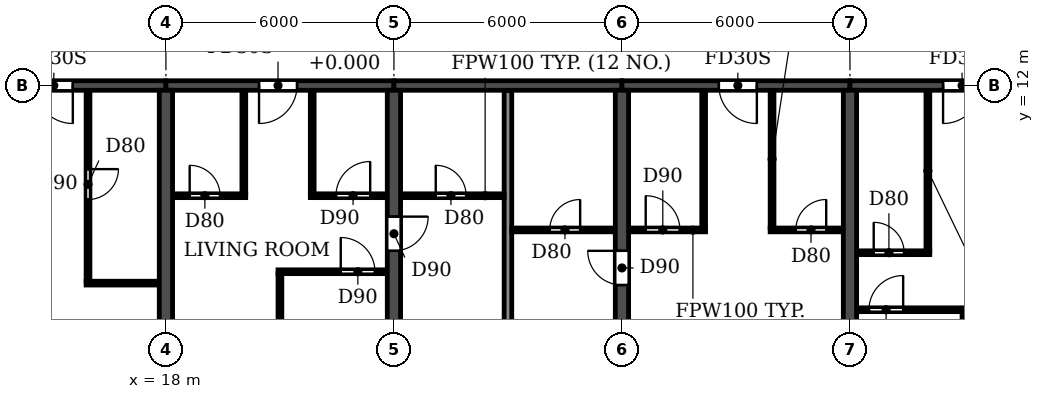
"""IFC4 building model, lengths in metres.
Left out: names, types, materials, properties, quantities, classifications, styles, units other than length and angle.
Written with IfcOpenShell. Run it as: python <this file> out.ifc"""

import sys

from ifc_helpers import new_model, si_unit, direction, frame, frame_2d, origin, place, context, subcontext, project, spatial, rectangle, extrude, element, fill, save


model = new_model("IFC4")
c1 = context("Model", 3, precision=1e-05, world=origin(), true_north=direction((0.0, 1.0)))
c2 = subcontext(c1, "Body", "Model", "MODEL_VIEW")
j1 = project(units=[si_unit("LENGTHUNIT", "METRE"), si_unit("PLANEANGLEUNIT", "RADIAN")], contexts=[c1])
p1 = place(None, origin())
s1 = spatial("IfcSite", under=j1, at=p1, CompositionType="ELEMENT")
p2 = place(p1, origin())
s2 = spatial("IfcBuilding", under=s1, at=p2, CompositionType="ELEMENT")
p3 = place(p2, frame((0.0, 0.0, 92.7)))
s3 = spatial("IfcBuildingStorey", under=s2, at=p3, CompositionType="ELEMENT", Elevation=92.7)
p4 = place(p3, frame((18.0, 0.2, 0.0), z_axis=(0.0, 0.0, 1.0), x_axis=(0.0, 1.0, 0.0)))
e1 = element("IfcWall", 1, at=p4, inside=s3, PredefinedType="SHEAR", context=c2, shape_type="SweptSolid", body=[
    extrude(rectangle(XDim=11.675, YDim=0.35, at=frame_2d((5.837, 0.0))), origin(), (0.0, 0.0, 1.0), 3.06),
])
p5 = place(p3, frame((24.0, 0.2, 0.0), z_axis=(0.0, 0.0, 1.0), x_axis=(0.0, 1.0, 0.0)))
e2 = element("IfcWall", 2, at=p5, inside=s3, PredefinedType="SHEAR", context=c2, shape_type="SweptSolid", body=[
    extrude(rectangle(XDim=11.675, YDim=0.35, at=frame_2d((5.837, 0.0))), origin(), (0.0, 0.0, 1.0), 3.06),
])
p6 = place(p5, frame((7.45, 0.0, 0.0)))
e3 = element("IfcOpeningElement", 3, at=p6, cuts=e2, PredefinedType="OPENING", context=c2, shape_type="SweptSolid", body=[
    extrude(rectangle(XDim=0.9, YDim=2.1, at=frame_2d((0.45, 1.05))), frame((0.0, 0.185, 0.0), z_axis=(0.0, -1.0, 0.0), x_axis=(1.0, 0.0, 0.0)), (0.0, 0.0, 1.0), 0.37),
])
p7 = place(p3, frame((30.0, 0.2, 0.0), z_axis=(0.0, 0.0, 1.0), x_axis=(0.0, 1.0, 0.0)))
e4 = element("IfcWall", 4, at=p7, inside=s3, PredefinedType="SHEAR", context=c2, shape_type="SweptSolid", body=[
    extrude(rectangle(XDim=11.675, YDim=0.35, at=frame_2d((5.837, 0.0))), origin(), (0.0, 0.0, 1.0), 3.06),
])
p8 = place(p7, frame((6.55, 0.0, 0.0)))
e5 = element("IfcOpeningElement", 5, at=p8, cuts=e4, PredefinedType="OPENING", context=c2, shape_type="SweptSolid", body=[
    extrude(rectangle(XDim=0.9, YDim=2.1, at=frame_2d((0.45, 1.05))), frame((0.0, 0.185, 0.0), z_axis=(0.0, -1.0, 0.0), x_axis=(1.0, 0.0, 0.0)), (0.0, 0.0, 1.0), 0.37),
])
p9 = place(p3, frame((36.0, 0.2, 0.0), z_axis=(0.0, 0.0, 1.0), x_axis=(0.0, 1.0, 0.0)))
e6 = element("IfcWall", 6, at=p9, inside=s3, PredefinedType="SHEAR", context=c2, shape_type="SweptSolid", body=[
    extrude(rectangle(XDim=11.675, YDim=0.35, at=frame_2d((5.837, 0.0))), origin(), (0.0, 0.0, 1.0), 3.06),
])
p10 = place(p3, frame((12.0, 12.0, 0.0), z_axis=(0.0, 0.0, 1.0), x_axis=(1.0, 0.0, 0.0)))
e7 = element("IfcWall", 7, at=p10, inside=s3, PredefinedType="SHEAR", context=c2, shape_type="SweptSolid", body=[
    extrude(rectangle(XDim=6.0, YDim=0.25, at=frame_2d((3.0, 0.0))), origin(), (0.0, 0.0, 1.0), 2.46),
])
p11 = place(p10, frame((2.55, 0.0, 0.0)))
e8 = element("IfcOpeningElement", 8, at=p11, cuts=e7, PredefinedType="OPENING", context=c2, shape_type="SweptSolid", body=[
    extrude(rectangle(XDim=1.0, YDim=2.1, at=frame_2d((0.5, 1.05))), frame((0.0, 0.135, 0.0), z_axis=(0.0, -1.0, 0.0), x_axis=(1.0, 0.0, 0.0)), (0.0, 0.0, 1.0), 0.27),
])
p12 = place(p3, frame((18.0, 12.0, 0.0), z_axis=(0.0, 0.0, 1.0), x_axis=(1.0, 0.0, 0.0)))
e9 = element("IfcWall", 9, at=p12, inside=s3, PredefinedType="SHEAR", context=c2, shape_type="SweptSolid", body=[
    extrude(rectangle(XDim=6.0, YDim=0.25, at=frame_2d((3.0, 0.0))), origin(), (0.0, 0.0, 1.0), 2.46),
])
p13 = place(p12, frame((2.45, 0.0, 0.0)))
e10 = element("IfcOpeningElement", 10, at=p13, cuts=e9, PredefinedType="OPENING", context=c2, shape_type="SweptSolid", body=[
    extrude(rectangle(XDim=1.0, YDim=2.1, at=frame_2d((0.5, 1.05))), frame((0.0, 0.135, 0.0), z_axis=(0.0, -1.0, 0.0), x_axis=(1.0, 0.0, 0.0)), (0.0, 0.0, 1.0), 0.27),
])
p14 = place(p3, frame((24.0, 12.0, 0.0), z_axis=(0.0, 0.0, 1.0), x_axis=(1.0, 0.0, 0.0)))
e11 = element("IfcWall", 11, at=p14, inside=s3, PredefinedType="SHEAR", context=c2, shape_type="SweptSolid", body=[
    extrude(rectangle(XDim=6.0, YDim=0.25, at=frame_2d((3.0, 0.0))), origin(), (0.0, 0.0, 1.0), 2.46),
])
p15 = place(p3, frame((30.0, 12.0, 0.0), z_axis=(0.0, 0.0, 1.0), x_axis=(1.0, 0.0, 0.0)))
e12 = element("IfcWall", 12, at=p15, inside=s3, PredefinedType="SHEAR", context=c2, shape_type="SweptSolid", body=[
    extrude(rectangle(XDim=6.0, YDim=0.25, at=frame_2d((3.0, 0.0))), origin(), (0.0, 0.0, 1.0), 2.46),
])
p16 = place(p15, frame((2.55, 0.0, 0.0)))
e13 = element("IfcOpeningElement", 13, at=p16, cuts=e12, PredefinedType="OPENING", context=c2, shape_type="SweptSolid", body=[
    extrude(rectangle(XDim=1.0, YDim=2.1, at=frame_2d((0.5, 1.05))), frame((0.0, 0.135, 0.0), z_axis=(0.0, -1.0, 0.0), x_axis=(1.0, 0.0, 0.0)), (0.0, 0.0, 1.0), 0.27),
])
p17 = place(p3, frame((36.0, 12.0, 0.0), z_axis=(0.0, 0.0, 1.0), x_axis=(1.0, 0.0, 0.0)))
e14 = element("IfcWall", 14, at=p17, inside=s3, PredefinedType="SHEAR", context=c2, shape_type="SweptSolid", body=[
    extrude(rectangle(XDim=6.0, YDim=0.25, at=frame_2d((3.0, 0.0))), origin(), (0.0, 0.0, 1.0), 2.46),
])
p18 = place(p17, frame((2.45, 0.0, 0.0)))
e15 = element("IfcOpeningElement", 15, at=p18, cuts=e14, PredefinedType="OPENING", context=c2, shape_type="SweptSolid", body=[
    extrude(rectangle(XDim=1.0, YDim=2.1, at=frame_2d((0.5, 1.05))), frame((0.0, 0.135, 0.0), z_axis=(0.0, -1.0, 0.0), x_axis=(1.0, 0.0, 0.0)), (0.0, 0.0, 1.0), 0.27),
])
p19 = place(p3, frame((27.0, 0.06, 0.0), z_axis=(0.0, 0.0, 1.0), x_axis=(0.0, 1.0, 0.0)))
e16 = element("IfcWall", 16, at=p19, inside=s3, PredefinedType="PARTITIONING", context=c2, shape_type="SweptSolid", body=[
    extrude(rectangle(XDim=11.805, YDim=0.2, at=frame_2d((5.902, 0.0))), origin(), (0.0, 0.0, 1.0), 3.06),
])
p20 = place(p3, frame((36.185, 6.1, 0.0), z_axis=(0.0, 0.0, 1.0), x_axis=(1.0, 0.0, 0.0)))
e17 = element("IfcWall", 17, at=p20, inside=s3, PredefinedType="PARTITIONING", context=c2, shape_type="SweptSolid", body=[
    extrude(rectangle(XDim=2.865, YDim=0.1, at=frame_2d((1.433, 0.0))), origin(), (0.0, 0.0, 1.0), 3.06),
])
p21 = place(p20, frame((0.315, 0.0, 0.0)))
e18 = element("IfcOpeningElement", 18, at=p21, cuts=e17, PredefinedType="OPENING", context=c2, shape_type="SweptSolid", body=[
    extrude(rectangle(XDim=0.9, YDim=2.1, at=frame_2d((0.45, 1.05))), frame((0.0, 0.06, 0.0), z_axis=(0.0, -1.0, 0.0), x_axis=(1.0, 0.0, 0.0)), (0.0, 0.0, 1.0), 0.12),
])
p22 = place(p3, frame((15.9, 6.8, 0.0), z_axis=(0.0, 0.0, 1.0), x_axis=(1.0, 0.0, 0.0)))
e19 = element("IfcWall", 19, at=p22, inside=s3, PredefinedType="PARTITIONING", context=c2, shape_type="SweptSolid", body=[
    extrude(rectangle(XDim=1.915, YDim=0.1, at=frame_2d((0.958, 0.0))), origin(), (0.0, 0.0, 1.0), 3.06),
])
p23 = place(p3, frame((20.95, 7.1, 0.0), z_axis=(0.0, 0.0, 1.0), x_axis=(1.0, 0.0, 0.0)))
e20 = element("IfcWall", 20, at=p23, inside=s3, PredefinedType="PARTITIONING", context=c2, shape_type="SweptSolid", body=[
    extrude(rectangle(XDim=2.865, YDim=0.1, at=frame_2d((1.433, 0.0))), origin(), (0.0, 0.0, 1.0), 3.06),
])
p24 = place(p23, frame((1.65, 0.0, 0.0)))
e21 = element("IfcOpeningElement", 21, at=p24, cuts=e20, PredefinedType="OPENING", context=c2, shape_type="SweptSolid", body=[
    extrude(rectangle(XDim=0.9, YDim=2.1, at=frame_2d((0.45, 1.05))), frame((0.0, 0.06, 0.0), z_axis=(0.0, -1.0, 0.0), x_axis=(1.0, 0.0, 0.0)), (0.0, 0.0, 1.0), 0.12),
])
p25 = place(p3, frame((36.185, 7.6, 0.0), z_axis=(0.0, 0.0, 1.0), x_axis=(1.0, 0.0, 0.0)))
e22 = element("IfcWall", 22, at=p25, inside=s3, PredefinedType="PARTITIONING", context=c2, shape_type="SweptSolid", body=[
    extrude(rectangle(XDim=1.915, YDim=0.1, at=frame_2d((0.958, 0.0))), origin(), (0.0, 0.0, 1.0), 3.06),
])
p26 = place(p25, frame((0.44, 0.0, 0.0)))
e23 = element("IfcOpeningElement", 23, at=p26, cuts=e22, PredefinedType="OPENING", context=c2, shape_type="SweptSolid", body=[
    extrude(rectangle(XDim=0.8, YDim=2.1, at=frame_2d((0.4, 1.05))), frame((0.0, 0.06, 0.0), z_axis=(0.0, -1.0, 0.0), x_axis=(1.0, 0.0, 0.0)), (0.0, 0.0, 1.0), 0.12),
])
p27 = place(p3, frame((27.1, 8.2, 0.0), z_axis=(0.0, 0.0, 1.0), x_axis=(1.0, 0.0, 0.0)))
e24 = element("IfcWall", 24, at=p27, inside=s3, PredefinedType="PARTITIONING", context=c2, shape_type="SweptSolid", body=[
    extrude(rectangle(XDim=2.715, YDim=0.1, at=frame_2d((1.357, 0.0))), origin(), (0.0, 0.0, 1.0), 3.06),
])
p28 = place(p27, frame((1.0, 0.0, 0.0)))
e25 = element("IfcOpeningElement", 25, at=p28, cuts=e24, PredefinedType="OPENING", context=c2, shape_type="SweptSolid", body=[
    extrude(rectangle(XDim=0.8, YDim=2.1, at=frame_2d((0.4, 1.05))), frame((0.0, 0.06, 0.0), z_axis=(0.0, -1.0, 0.0), x_axis=(1.0, 0.0, 0.0)), (0.0, 0.0, 1.0), 0.12),
])
p29 = place(p3, frame((30.185, 8.2, 0.0), z_axis=(0.0, 0.0, 1.0), x_axis=(1.0, 0.0, 0.0)))
e26 = element("IfcWall", 26, at=p29, inside=s3, PredefinedType="PARTITIONING", context=c2, shape_type="SweptSolid", body=[
    extrude(rectangle(XDim=2.015, YDim=0.1, at=frame_2d((1.007, 0.0))), origin(), (0.0, 0.0, 1.0), 3.06),
])
p30 = place(p29, frame((0.44, 0.0, 0.0)))
e27 = element("IfcOpeningElement", 27, at=p30, cuts=e26, PredefinedType="OPENING", context=c2, shape_type="SweptSolid", body=[
    extrude(rectangle(XDim=0.9, YDim=2.1, at=frame_2d((0.45, 1.05))), frame((0.0, 0.06, 0.0), z_axis=(0.0, -1.0, 0.0), x_axis=(1.0, 0.0, 0.0)), (0.0, 0.0, 1.0), 0.12),
])
p31 = place(p3, frame((33.9, 8.2, 0.0), z_axis=(0.0, 0.0, 1.0), x_axis=(1.0, 0.0, 0.0)))
e28 = element("IfcWall", 28, at=p31, inside=s3, PredefinedType="PARTITIONING", context=c2, shape_type="SweptSolid", body=[
    extrude(rectangle(XDim=1.915, YDim=0.1, at=frame_2d((0.958, 0.0))), origin(), (0.0, 0.0, 1.0), 3.06),
])
p32 = place(p31, frame((0.675, 0.0, 0.0)))
e29 = element("IfcOpeningElement", 29, at=p32, cuts=e28, PredefinedType="OPENING", context=c2, shape_type="SweptSolid", body=[
    extrude(rectangle(XDim=0.8, YDim=2.1, at=frame_2d((0.4, 1.05))), frame((0.0, 0.06, 0.0), z_axis=(0.0, -1.0, 0.0), x_axis=(1.0, 0.0, 0.0)), (0.0, 0.0, 1.0), 0.12),
])
p33 = place(p3, frame((18.185, 9.1, 0.0), z_axis=(0.0, 0.0, 1.0), x_axis=(1.0, 0.0, 0.0)))
e30 = element("IfcWall", 30, at=p33, inside=s3, PredefinedType="PARTITIONING", context=c2, shape_type="SweptSolid", body=[
    extrude(rectangle(XDim=1.915, YDim=0.1, at=frame_2d((0.958, 0.0))), origin(), (0.0, 0.0, 1.0), 3.06),
])
p34 = place(p33, frame((0.44, 0.0, 0.0)))
e31 = element("IfcOpeningElement", 31, at=p34, cuts=e30, PredefinedType="OPENING", context=c2, shape_type="SweptSolid", body=[
    extrude(rectangle(XDim=0.8, YDim=2.1, at=frame_2d((0.4, 1.05))), frame((0.0, 0.06, 0.0), z_axis=(0.0, -1.0, 0.0), x_axis=(1.0, 0.0, 0.0)), (0.0, 0.0, 1.0), 0.12),
])
p35 = place(p3, frame((21.8, 9.1, 0.0), z_axis=(0.0, 0.0, 1.0), x_axis=(1.0, 0.0, 0.0)))
e32 = element("IfcWall", 32, at=p35, inside=s3, PredefinedType="PARTITIONING", context=c2, shape_type="SweptSolid", body=[
    extrude(rectangle(XDim=2.015, YDim=0.1, at=frame_2d((1.007, 0.0))), origin(), (0.0, 0.0, 1.0), 3.06),
])
p36 = place(p35, frame((0.675, 0.0, 0.0)))
e33 = element("IfcOpeningElement", 33, at=p36, cuts=e32, PredefinedType="OPENING", context=c2, shape_type="SweptSolid", body=[
    extrude(rectangle(XDim=0.9, YDim=2.1, at=frame_2d((0.45, 1.05))), frame((0.0, 0.06, 0.0), z_axis=(0.0, -1.0, 0.0), x_axis=(1.0, 0.0, 0.0)), (0.0, 0.0, 1.0), 0.12),
])
p37 = place(p3, frame((24.185, 9.1, 0.0), z_axis=(0.0, 0.0, 1.0), x_axis=(1.0, 0.0, 0.0)))
e34 = element("IfcWall", 34, at=p37, inside=s3, PredefinedType="PARTITIONING", context=c2, shape_type="SweptSolid", body=[
    extrude(rectangle(XDim=2.715, YDim=0.1, at=frame_2d((1.357, 0.0))), origin(), (0.0, 0.0, 1.0), 3.06),
])
p38 = place(p37, frame((0.915, 0.0, 0.0)))
e35 = element("IfcOpeningElement", 35, at=p38, cuts=e34, PredefinedType="OPENING", context=c2, shape_type="SweptSolid", body=[
    extrude(rectangle(XDim=0.8, YDim=2.1, at=frame_2d((0.4, 1.05))), frame((0.0, 0.06, 0.0), z_axis=(0.0, -1.0, 0.0), x_axis=(1.0, 0.0, 0.0)), (0.0, 0.0, 1.0), 0.12),
])
p39 = place(p3, frame((15.95, 6.85, 0.0), z_axis=(0.0, 0.0, 1.0), x_axis=(0.0, 1.0, 0.0)))
e36 = element("IfcWall", 36, at=p39, inside=s3, PredefinedType="PARTITIONING", context=c2, shape_type="SweptSolid", body=[
    extrude(rectangle(XDim=5.015, YDim=0.1, at=frame_2d((2.507, 0.0))), origin(), (0.0, 0.0, 1.0), 3.06),
])
p40 = place(p39, frame((2.15, 0.0, 0.0)))
e37 = element("IfcOpeningElement", 37, at=p40, cuts=e36, PredefinedType="OPENING", context=c2, shape_type="SweptSolid", body=[
    extrude(rectangle(XDim=0.8, YDim=2.1, at=frame_2d((0.4, 1.05))), frame((0.0, 0.06, 0.0), z_axis=(0.0, -1.0, 0.0), x_axis=(1.0, 0.0, 0.0)), (0.0, 0.0, 1.0), 0.12),
])
p41 = place(p3, frame((20.05, 9.15, 0.0), z_axis=(0.0, 0.0, 1.0), x_axis=(0.0, 1.0, 0.0)))
e38 = element("IfcWall", 38, at=p41, inside=s3, PredefinedType="PARTITIONING", context=c2, shape_type="SweptSolid", body=[
    extrude(rectangle(XDim=2.715, YDim=0.1, at=frame_2d((1.357, 0.0))), origin(), (0.0, 0.0, 1.0), 3.06),
])
p42 = place(p3, frame((21.0, 0.06, 0.0), z_axis=(0.0, 0.0, 1.0), x_axis=(0.0, 1.0, 0.0)))
e39 = element("IfcWall", 39, at=p42, inside=s3, PredefinedType="PARTITIONING", context=c2, shape_type="SweptSolid", body=[
    extrude(rectangle(XDim=6.99, YDim=0.1, at=frame_2d((3.495, 0.0))), origin(), (0.0, 0.0, 1.0), 3.06),
])
p43 = place(p3, frame((21.85, 9.15, 0.0), z_axis=(0.0, 0.0, 1.0), x_axis=(0.0, 1.0, 0.0)))
e40 = element("IfcWall", 40, at=p43, inside=s3, PredefinedType="PARTITIONING", context=c2, shape_type="SweptSolid", body=[
    extrude(rectangle(XDim=2.715, YDim=0.1, at=frame_2d((1.357, 0.0))), origin(), (0.0, 0.0, 1.0), 3.06),
])
for number, where, z_axis, x_axis in (
    (41, (32.15, 8.25, 0.0), (0.0, 0.0, 1.0), (0.0, 1.0, 0.0)),
    (42, (33.95, 8.25, 0.0), (0.0, 0.0, 1.0), (0.0, 1.0, 0.0)),
):
    element("IfcWall", number, at=place(p3, frame(where, z_axis=z_axis, x_axis=x_axis)), inside=s3, PredefinedType="PARTITIONING", context=c2, shape_type="SweptSolid", body=[
        extrude(rectangle(XDim=3.615, YDim=0.1, at=frame_2d((1.808, 0.0))), origin(), (0.0, 0.0, 1.0), 3.06),
    ])
p44 = place(p3, frame((38.05, 7.65, 0.0), z_axis=(0.0, 0.0, 1.0), x_axis=(0.0, 1.0, 0.0)))
e43 = element("IfcWall", 43, at=p44, inside=s3, PredefinedType="PARTITIONING", context=c2, shape_type="SweptSolid", body=[
    extrude(rectangle(XDim=4.215, YDim=0.1, at=frame_2d((2.107, 0.0))), origin(), (0.0, 0.0, 1.0), 3.06),
])
p45 = place(p3, frame((39.0, 0.06, 0.0), z_axis=(0.0, 0.0, 1.0), x_axis=(0.0, 1.0, 0.0)))
e44 = element("IfcWall", 44, at=p45, inside=s3, PredefinedType="PARTITIONING", context=c2, shape_type="SweptSolid", body=[
    extrude(rectangle(XDim=5.99, YDim=0.1, at=frame_2d((2.995, 0.0))), origin(), (0.0, 0.0, 1.0), 3.06),
])
p46 = place(p11, frame((1.0, 0.0, 0.0), z_axis=(0.0, 0.0, 1.0), x_axis=(-1.0, 0.0, 0.0)))
e45 = element("IfcDoor", 45, at=p46, inside=s3, OperationType="SINGLE_SWING_LEFT", PredefinedType="DOOR", context=c2, shape_type="SweptSolid", body=[
    extrude(rectangle(XDim=1.0, YDim=2.1, at=frame_2d((0.5, 1.05))), frame((0.0, 0.025, 0.0), z_axis=(0.0, -1.0, 0.0), x_axis=(1.0, 0.0, 0.0)), (0.0, 0.0, 1.0), 0.05),
])
fill(e8, e45)
p47 = place(p40, frame((0.8, 0.0, 0.0), z_axis=(0.0, 0.0, 1.0), x_axis=(-1.0, 0.0, 0.0)))
e46 = element("IfcDoor", 46, at=p47, inside=s3, OperationType="SINGLE_SWING_LEFT", PredefinedType="DOOR", context=c2, shape_type="SweptSolid", body=[
    extrude(rectangle(XDim=0.8, YDim=2.1, at=frame_2d((0.4, 1.05))), frame((0.0, 0.025, 0.0), z_axis=(0.0, -1.0, 0.0), x_axis=(1.0, 0.0, 0.0)), (0.0, 0.0, 1.0), 0.05),
])
fill(e37, e46)
p48 = place(p38, origin())
e47 = element("IfcDoor", 47, at=p48, inside=s3, OperationType="SINGLE_SWING_LEFT", PredefinedType="DOOR", context=c2, shape_type="SweptSolid", body=[
    extrude(rectangle(XDim=0.8, YDim=2.1, at=frame_2d((0.4, 1.05))), frame((0.0, 0.025, 0.0), z_axis=(0.0, -1.0, 0.0), x_axis=(1.0, 0.0, 0.0)), (0.0, 0.0, 1.0), 0.05),
])
fill(e35, e47)
p49 = place(p34, origin())
e48 = element("IfcDoor", 48, at=p49, inside=s3, OperationType="SINGLE_SWING_LEFT", PredefinedType="DOOR", context=c2, shape_type="SweptSolid", body=[
    extrude(rectangle(XDim=0.8, YDim=2.1, at=frame_2d((0.4, 1.05))), frame((0.0, 0.025, 0.0), z_axis=(0.0, -1.0, 0.0), x_axis=(1.0, 0.0, 0.0)), (0.0, 0.0, 1.0), 0.05),
])
fill(e31, e48)
p50 = place(p13, frame((1.0, 0.0, 0.0), z_axis=(0.0, 0.0, 1.0), x_axis=(-1.0, 0.0, 0.0)))
e49 = element("IfcDoor", 49, at=p50, inside=s3, OperationType="SINGLE_SWING_RIGHT", PredefinedType="DOOR", context=c2, shape_type="SweptSolid", body=[
    extrude(rectangle(XDim=1.0, YDim=2.1, at=frame_2d((0.5, 1.05))), frame((0.0, 0.025, 0.0), z_axis=(0.0, -1.0, 0.0), x_axis=(1.0, 0.0, 0.0)), (0.0, 0.0, 1.0), 0.05),
])
fill(e10, e49)
p51 = place(p36, origin())
e50 = element("IfcDoor", 50, at=p51, inside=s3, OperationType="SINGLE_SWING_RIGHT", PredefinedType="DOOR", context=c2, shape_type="SweptSolid", body=[
    extrude(rectangle(XDim=0.9, YDim=2.1, at=frame_2d((0.45, 1.05))), frame((0.0, 0.025, 0.0), z_axis=(0.0, -1.0, 0.0), x_axis=(1.0, 0.0, 0.0)), (0.0, 0.0, 1.0), 0.05),
])
fill(e33, e50)
p52 = place(p24, origin())
e51 = element("IfcDoor", 51, at=p52, inside=s3, OperationType="SINGLE_SWING_LEFT", PredefinedType="DOOR", context=c2, shape_type="SweptSolid", body=[
    extrude(rectangle(XDim=0.9, YDim=2.1, at=frame_2d((0.45, 1.05))), frame((0.0, 0.025, 0.0), z_axis=(0.0, -1.0, 0.0), x_axis=(1.0, 0.0, 0.0)), (0.0, 0.0, 1.0), 0.05),
])
fill(e21, e51)
p53 = place(p6, frame((0.9, 0.0, 0.0), z_axis=(0.0, 0.0, 1.0), x_axis=(-1.0, 0.0, 0.0)))
e52 = element("IfcDoor", 52, at=p53, inside=s3, OperationType="SINGLE_SWING_LEFT", PredefinedType="DOOR", context=c2, shape_type="SweptSolid", body=[
    extrude(rectangle(XDim=0.9, YDim=2.1, at=frame_2d((0.45, 1.05))), frame((0.0, 0.025, 0.0), z_axis=(0.0, -1.0, 0.0), x_axis=(1.0, 0.0, 0.0)), (0.0, 0.0, 1.0), 0.05),
])
fill(e3, e52)
p54 = place(p28, origin())
e53 = element("IfcDoor", 53, at=p54, inside=s3, OperationType="SINGLE_SWING_RIGHT", PredefinedType="DOOR", context=c2, shape_type="SweptSolid", body=[
    extrude(rectangle(XDim=0.8, YDim=2.1, at=frame_2d((0.4, 1.05))), frame((0.0, 0.025, 0.0), z_axis=(0.0, -1.0, 0.0), x_axis=(1.0, 0.0, 0.0)), (0.0, 0.0, 1.0), 0.05),
])
fill(e25, e53)
p55 = place(p8, origin())
e54 = element("IfcDoor", 54, at=p55, inside=s3, OperationType="SINGLE_SWING_RIGHT", PredefinedType="DOOR", context=c2, shape_type="SweptSolid", body=[
    extrude(rectangle(XDim=0.9, YDim=2.1, at=frame_2d((0.45, 1.05))), frame((0.0, 0.025, 0.0), z_axis=(0.0, -1.0, 0.0), x_axis=(1.0, 0.0, 0.0)), (0.0, 0.0, 1.0), 0.05),
])
fill(e5, e54)
p56 = place(p30, origin())
e55 = element("IfcDoor", 55, at=p56, inside=s3, OperationType="SINGLE_SWING_LEFT", PredefinedType="DOOR", context=c2, shape_type="SweptSolid", body=[
    extrude(rectangle(XDim=0.9, YDim=2.1, at=frame_2d((0.45, 1.05))), frame((0.0, 0.025, 0.0), z_axis=(0.0, -1.0, 0.0), x_axis=(1.0, 0.0, 0.0)), (0.0, 0.0, 1.0), 0.05),
])
fill(e27, e55)
p57 = place(p16, frame((1.0, 0.0, 0.0), z_axis=(0.0, 0.0, 1.0), x_axis=(-1.0, 0.0, 0.0)))
e56 = element("IfcDoor", 56, at=p57, inside=s3, OperationType="SINGLE_SWING_LEFT", PredefinedType="DOOR", context=c2, shape_type="SweptSolid", body=[
    extrude(rectangle(XDim=1.0, YDim=2.1, at=frame_2d((0.5, 1.05))), frame((0.0, 0.025, 0.0), z_axis=(0.0, -1.0, 0.0), x_axis=(1.0, 0.0, 0.0)), (0.0, 0.0, 1.0), 0.05),
])
fill(e13, e56)
p58 = place(p32, origin())
e57 = element("IfcDoor", 57, at=p58, inside=s3, OperationType="SINGLE_SWING_RIGHT", PredefinedType="DOOR", context=c2, shape_type="SweptSolid", body=[
    extrude(rectangle(XDim=0.8, YDim=2.1, at=frame_2d((0.4, 1.05))), frame((0.0, 0.025, 0.0), z_axis=(0.0, -1.0, 0.0), x_axis=(1.0, 0.0, 0.0)), (0.0, 0.0, 1.0), 0.05),
])
fill(e29, e57)
p59 = place(p21, origin())
e58 = element("IfcDoor", 58, at=p59, inside=s3, OperationType="SINGLE_SWING_RIGHT", PredefinedType="DOOR", context=c2, shape_type="SweptSolid", body=[
    extrude(rectangle(XDim=0.9, YDim=2.1, at=frame_2d((0.45, 1.05))), frame((0.0, 0.025, 0.0), z_axis=(0.0, -1.0, 0.0), x_axis=(1.0, 0.0, 0.0)), (0.0, 0.0, 1.0), 0.05),
])
fill(e18, e58)
p60 = place(p26, origin())
e59 = element("IfcDoor", 59, at=p60, inside=s3, OperationType="SINGLE_SWING_LEFT", PredefinedType="DOOR", context=c2, shape_type="SweptSolid", body=[
    extrude(rectangle(XDim=0.8, YDim=2.1, at=frame_2d((0.4, 1.05))), frame((0.0, 0.025, 0.0), z_axis=(0.0, -1.0, 0.0), x_axis=(1.0, 0.0, 0.0)), (0.0, 0.0, 1.0), 0.05),
])
fill(e23, e59)
p61 = place(p18, frame((1.0, 0.0, 0.0), z_axis=(0.0, 0.0, 1.0), x_axis=(-1.0, 0.0, 0.0)))
e60 = element("IfcDoor", 60, at=p61, inside=s3, OperationType="SINGLE_SWING_RIGHT", PredefinedType="DOOR", context=c2, shape_type="SweptSolid", body=[
    extrude(rectangle(XDim=1.0, YDim=2.1, at=frame_2d((0.5, 1.05))), frame((0.0, 0.025, 0.0), z_axis=(0.0, -1.0, 0.0), x_axis=(1.0, 0.0, 0.0)), (0.0, 0.0, 1.0), 0.05),
])
fill(e15, e60)
save(model, sys.argv[1])
